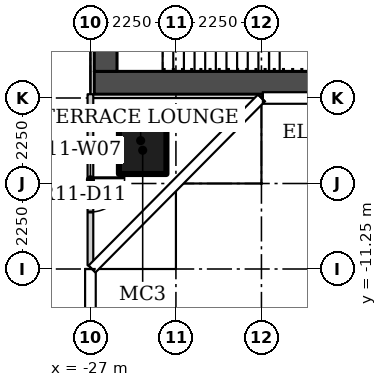
"""IFC4 building model, lengths in metres.
Left out: names, types, materials, properties, quantities, classifications, styles, units other than length and angle.
Written with IfcOpenShell. Run it as: python <this file> out.ifc"""

import sys

from ifc_helpers import new_model, si_unit, direction, frame, frame_2d, origin, origin_2d, place, context, subcontext, project, spatial, rectangle, hollow_rectangle, extrude, element, fill, save


model = new_model("IFC4")
c1 = context("Model", 3, precision=1e-05, world=origin(), true_north=direction((0.0, 1.0)))
c2 = subcontext(c1, "Body", "Model", "MODEL_VIEW")
j1 = project(units=[si_unit("LENGTHUNIT", "METRE"), si_unit("PLANEANGLEUNIT", "RADIAN")], contexts=[c1])
p1 = place(None, origin())
s1 = spatial("IfcSite", under=j1, at=p1, CompositionType="ELEMENT")
p2 = place(p1, origin())
s2 = spatial("IfcBuilding", under=s1, at=p2, CompositionType="ELEMENT")
p3 = place(p2, frame((0.0, 0.0, 109.2)))
s3 = spatial("IfcBuildingStorey", under=s2, at=p3, CompositionType="ELEMENT", Elevation=109.2)
p4 = place(p3, frame((-25.625, -8.125, 0.0)))
e1 = element("IfcColumn", 1, at=p4, inside=s3, PredefinedType="COLUMN", context=c2, shape_type="SweptSolid", body=[
    extrude(hollow_rectangle(XDim=1.25, YDim=1.25, WallThickness=0.05, at=origin_2d()), origin(), (0.0, 0.0, 1.0), 3.55),
])
p5 = place(p3, frame((-27.0, -6.65, 0.0), z_axis=(0.0, 0.0, 1.0), x_axis=(0.0, -1.0, 0.0)))
e2 = element("IfcWall", 2, at=p5, inside=s3, PredefinedType="PARTITIONING", context=c2, shape_type="SweptSolid", body=[
    extrude(rectangle(XDim=4.505, YDim=0.15, at=frame_2d((2.252, 0.0))), origin(), (0.0, 0.0, 1.0), 3.55),
])
p6 = place(p5, frame((2.2, 0.0, 0.0)))
e3 = element("IfcOpeningElement", 3, at=p6, cuts=e2, PredefinedType="OPENING", context=c2, shape_type="SweptSolid", body=[
    extrude(rectangle(XDim=0.9, YDim=2.1, at=frame_2d((0.45, 1.05))), frame((0.0, 0.085, 0.0), z_axis=(0.0, -1.0, 0.0), x_axis=(1.0, 0.0, 0.0)), (0.0, 0.0, 1.0), 0.17),
])
p7 = place(p3, frame((-26.9, -6.35, 0.0)))
e4 = element("IfcWall", 4, at=p7, inside=s3, PredefinedType="SHEAR", context=c2, shape_type="SweptSolid", body=[
    extrude(rectangle(XDim=13.3, YDim=0.6, at=frame_2d((6.65, 0.0))), origin(), (0.0, 0.0, 1.0), 3.55),
])
p8 = place(p3, frame((-26.6, 6.05, 0.0), z_axis=(0.0, 0.0, 1.0), x_axis=(0.0, -1.0, 0.0)))
e5 = element("IfcWall", 5, at=p8, inside=s3, PredefinedType="SHEAR", context=c2, shape_type="SweptSolid", body=[
    extrude(rectangle(XDim=12.1, YDim=0.6, at=frame_2d((6.05, 0.0))), origin(), (0.0, 0.0, 1.0), 3.55),
])
p9 = place(p8, frame((3.9, 0.0, 0.0)))
e6 = element("IfcOpeningElement", 6, at=p9, cuts=e5, PredefinedType="OPENING", context=c2, shape_type="SweptSolid", body=[
    extrude(rectangle(XDim=1.8, YDim=2.4, at=frame_2d((0.9, 1.2))), frame((0.0, 0.31, 0.0), z_axis=(0.0, -1.0, 0.0), x_axis=(1.0, 0.0, 0.0)), (0.0, 0.0, 1.0), 0.62),
])
p10 = place(p6, origin())
e7 = element("IfcDoor", 7, at=p10, inside=s3, OperationType="SINGLE_SWING_RIGHT", PredefinedType="DOOR", context=c2, shape_type="SweptSolid", body=[
    extrude(rectangle(XDim=0.9, YDim=2.1, at=frame_2d((0.45, 1.05))), frame((0.0, 0.025, 0.0), z_axis=(0.0, -1.0, 0.0), x_axis=(1.0, 0.0, 0.0)), (0.0, 0.0, 1.0), 0.05),
])
fill(e3, e7)
save(model, sys.argv[1])
